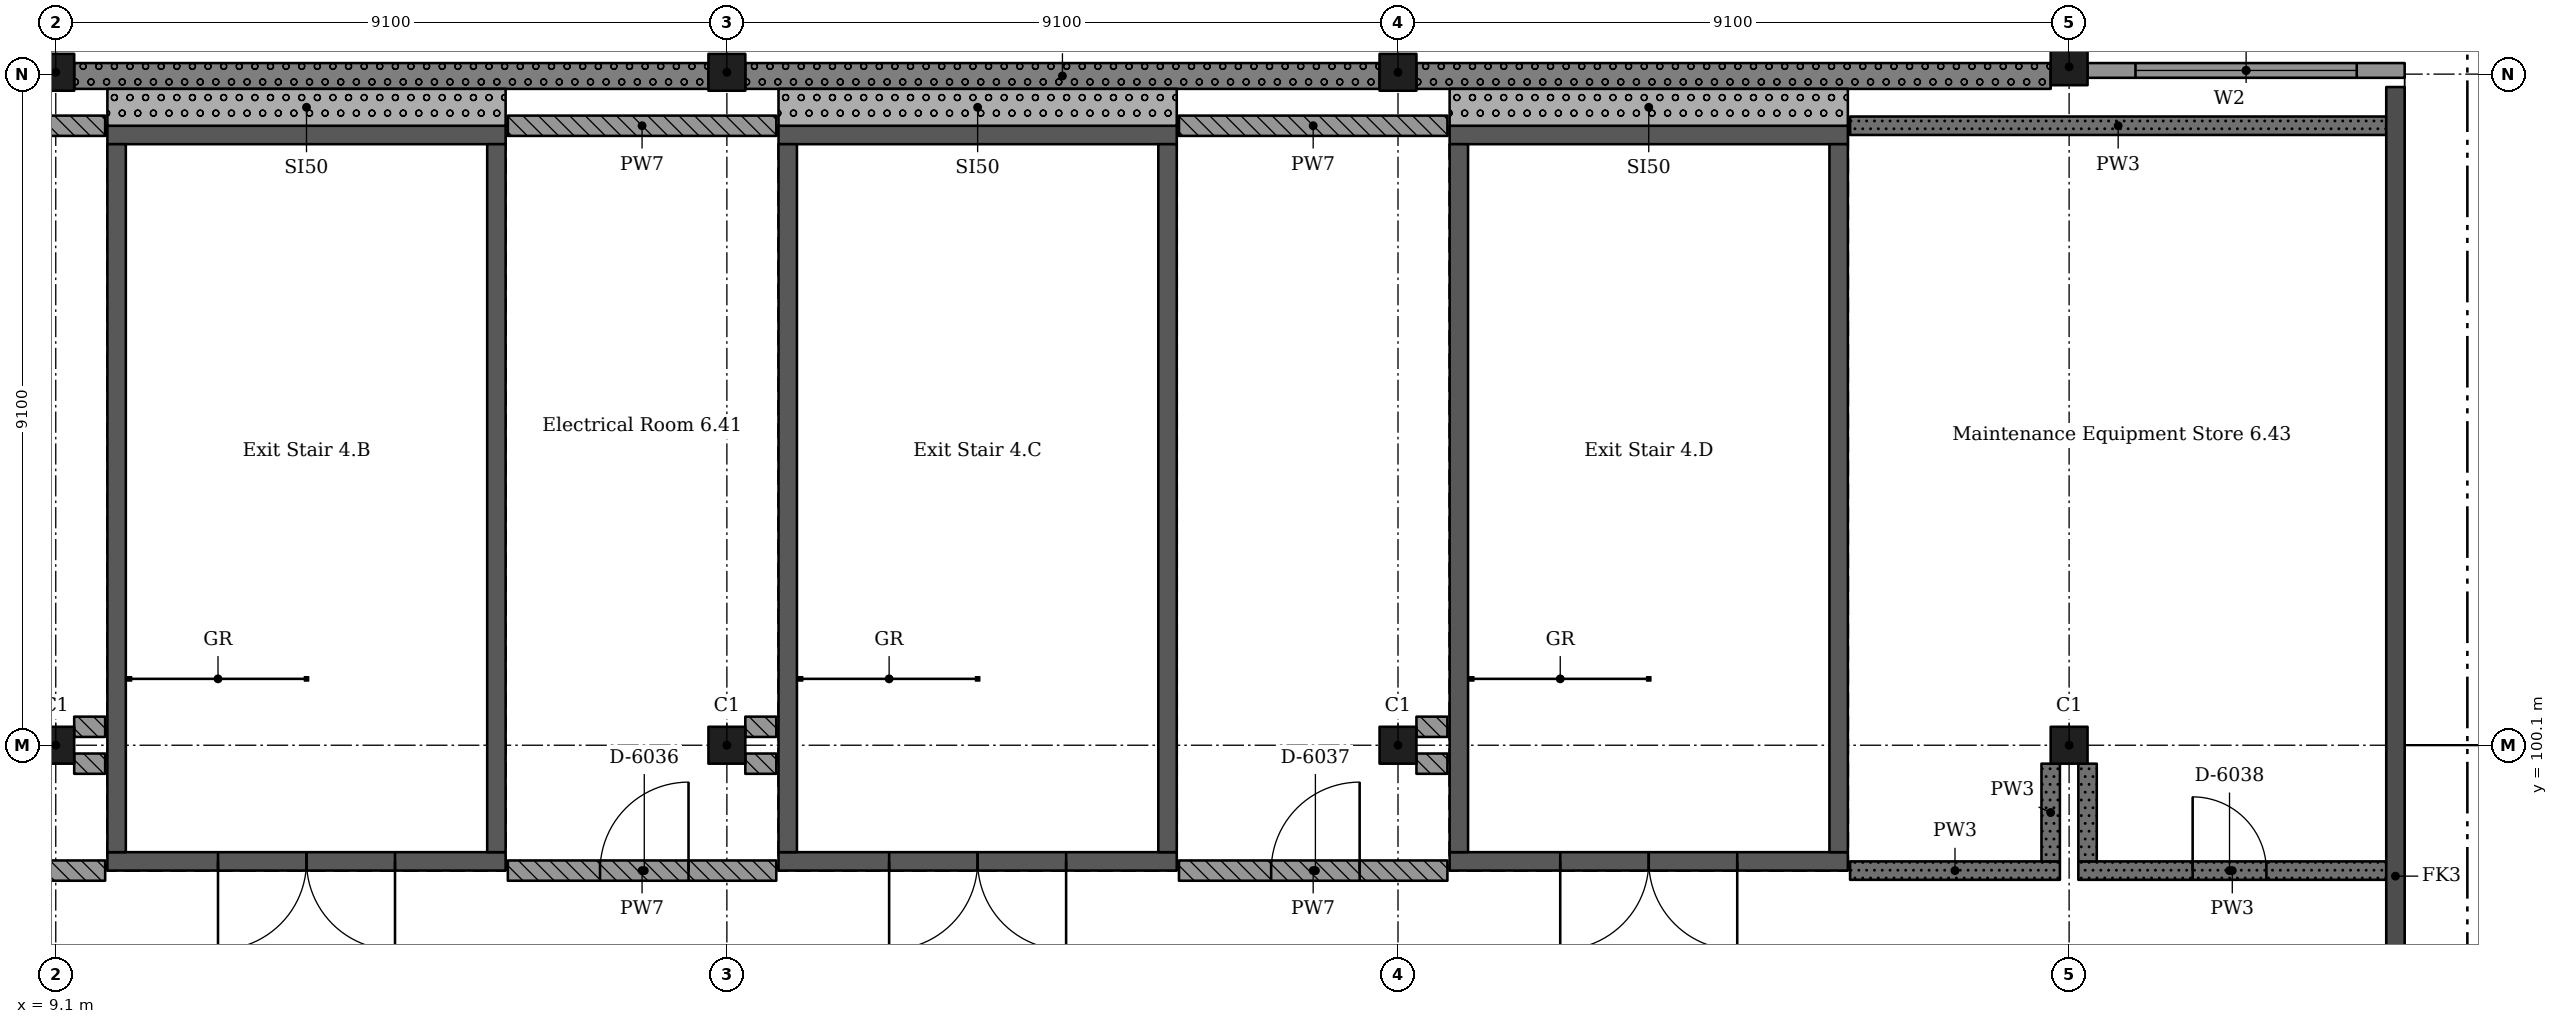
"""IFC4 building model, lengths in metres.
Left out: names, types, materials, properties, quantities, classifications, styles, units other than length and angle.
Written with IfcOpenShell. Run it as: python <this file> out.ifc"""

import sys

from ifc_helpers import new_model, si_unit, direction, frame, frame_2d, origin, origin_2d, place, context, subcontext, project, spatial, rectangle, extrude, element, fill, save


model = new_model("IFC4")
c1 = context("Model", 3, precision=1e-05, world=origin(), true_north=direction((0.0, 1.0)))
c2 = subcontext(c1, "Body", "Model", "MODEL_VIEW")
j1 = project(units=[si_unit("LENGTHUNIT", "METRE"), si_unit("PLANEANGLEUNIT", "RADIAN")], contexts=[c1])
p1 = place(None, origin())
s1 = spatial("IfcSite", under=j1, at=p1, CompositionType="ELEMENT")
p2 = place(p1, origin())
s2 = spatial("IfcBuilding", under=s1, at=p2, CompositionType="ELEMENT")
p3 = place(p2, frame((0.0, 0.0, 29.12)))
s3 = spatial("IfcBuildingStorey", under=s2, at=p3, CompositionType="ELEMENT", Elevation=29.12)
for number, where, z_axis, x_axis in (
    (1, (9.1, 100.1, 0.0), (0.0, 0.0, 1.0), (1.0, 0.0, 0.0)),
    (2, (9.1, 109.225, 0.0), (0.0, 0.0, 1.0), (1.0, 0.0, 0.0)),
    (3, (18.2, 100.1, 0.0), (0.0, 0.0, 1.0), (1.0, 0.0, 0.0)),
    (4, (18.2, 109.225, 0.0), (0.0, 0.0, 1.0), (1.0, 0.0, 0.0)),
    (5, (27.3, 100.1, 0.0), (0.0, 0.0, 1.0), (1.0, 0.0, 0.0)),
    (6, (27.3, 109.225, 0.0), (0.0, 0.0, 1.0), (1.0, 0.0, 0.0)),
    (7, (36.4, 100.1, 0.0), (0.0, 0.0, 1.0), (1.0, 0.0, 0.0)),
    (8, (36.4, 109.3, 0.0), (0.0, 0.0, 1.0), (1.0, 0.0, 0.0)),
):
    element("IfcColumn", number, at=place(p3, frame(where, z_axis=z_axis, x_axis=x_axis)), inside=s3, PredefinedType="COLUMN", context=c2, shape_type="SweptSolid", body=[
        extrude(rectangle(XDim=0.5, YDim=0.5, at=origin_2d()), origin(), (0.0, 0.0, 1.0), 4.55),
    ])
p4 = place(p3, frame((40.825, 68.25, 0.0), z_axis=(0.0, 0.0, 1.0), x_axis=(0.0, 1.0, 0.0)))
e9 = element("IfcWall", 9, at=p4, inside=s3, PredefinedType="SHEAR", context=c2, shape_type="SweptSolid", body=[
    extrude(rectangle(XDim=40.775, YDim=0.25, at=frame_2d((20.387, 0.0))), origin(), (0.0, 0.0, 1.0), 4.55),
])
p5 = place(p3, frame((15.2, 98.525, 0.0), z_axis=(0.0, 0.0, 1.0), x_axis=(-1.0, 0.0, 0.0)))
e10 = element("IfcWall", 10, at=p5, inside=s3, PredefinedType="SHEAR", context=c2, shape_type="SweptSolid", body=[
    extrude(rectangle(XDim=5.4, YDim=0.25, at=frame_2d((2.7, 0.0))), origin(), (0.0, 0.0, 1.0), 4.55),
])
p6 = place(p5, frame((1.5, 0.0, 0.0)))
e11 = element("IfcOpeningElement", 11, at=p6, cuts=e10, PredefinedType="OPENING", context=c2, shape_type="SweptSolid", body=[
    extrude(rectangle(XDim=2.4, YDim=2.1, at=frame_2d((1.2, 1.05))), frame((0.0, 0.135, 0.0), z_axis=(0.0, -1.0, 0.0), x_axis=(1.0, 0.0, 0.0)), (0.0, 0.0, 1.0), 0.27),
])
p7 = place(p3, frame((15.2, 108.375, 0.0), z_axis=(0.0, 0.0, 1.0), x_axis=(-1.0, 0.0, 0.0)))
e12 = element("IfcWall", 12, at=p7, inside=s3, PredefinedType="SHEAR", context=c2, shape_type="SweptSolid", body=[
    extrude(rectangle(XDim=5.4, YDim=0.25, at=frame_2d((2.7, 0.0))), origin(), (0.0, 0.0, 1.0), 4.55),
])
for number, where, z_axis, x_axis in (
    (13, (9.925, 108.25, 0.0), (0.0, 0.0, 1.0), (0.0, -1.0, 0.0)),
    (14, (15.075, 108.25, 0.0), (0.0, 0.0, 1.0), (0.0, -1.0, 0.0)),
):
    element("IfcWall", number, at=place(p3, frame(where, z_axis=z_axis, x_axis=x_axis)), inside=s3, PredefinedType="SHEAR", context=c2, shape_type="SweptSolid", body=[
        extrude(rectangle(XDim=9.6, YDim=0.25, at=frame_2d((4.8, 0.0))), origin(), (0.0, 0.0, 1.0), 4.55),
    ])
p8 = place(p3, frame((24.3, 98.525, 0.0), z_axis=(0.0, 0.0, 1.0), x_axis=(-1.0, 0.0, 0.0)))
e15 = element("IfcWall", 15, at=p8, inside=s3, PredefinedType="SHEAR", context=c2, shape_type="SweptSolid", body=[
    extrude(rectangle(XDim=5.4, YDim=0.25, at=frame_2d((2.7, 0.0))), origin(), (0.0, 0.0, 1.0), 4.55),
])
p9 = place(p8, frame((1.5, 0.0, 0.0)))
e16 = element("IfcOpeningElement", 16, at=p9, cuts=e15, PredefinedType="OPENING", context=c2, shape_type="SweptSolid", body=[
    extrude(rectangle(XDim=2.4, YDim=2.1, at=frame_2d((1.2, 1.05))), frame((0.0, 0.135, 0.0), z_axis=(0.0, -1.0, 0.0), x_axis=(1.0, 0.0, 0.0)), (0.0, 0.0, 1.0), 0.27),
])
p10 = place(p3, frame((24.3, 108.375, 0.0), z_axis=(0.0, 0.0, 1.0), x_axis=(-1.0, 0.0, 0.0)))
e17 = element("IfcWall", 17, at=p10, inside=s3, PredefinedType="SHEAR", context=c2, shape_type="SweptSolid", body=[
    extrude(rectangle(XDim=5.4, YDim=0.25, at=frame_2d((2.7, 0.0))), origin(), (0.0, 0.0, 1.0), 4.55),
])
for number, where, z_axis, x_axis in (
    (18, (19.025, 108.25, 0.0), (0.0, 0.0, 1.0), (0.0, -1.0, 0.0)),
    (19, (24.175, 108.25, 0.0), (0.0, 0.0, 1.0), (0.0, -1.0, 0.0)),
):
    element("IfcWall", number, at=place(p3, frame(where, z_axis=z_axis, x_axis=x_axis)), inside=s3, PredefinedType="SHEAR", context=c2, shape_type="SweptSolid", body=[
        extrude(rectangle(XDim=9.6, YDim=0.25, at=frame_2d((4.8, 0.0))), origin(), (0.0, 0.0, 1.0), 4.55),
    ])
p11 = place(p3, frame((33.4, 98.525, 0.0), z_axis=(0.0, 0.0, 1.0), x_axis=(-1.0, 0.0, 0.0)))
e20 = element("IfcWall", 20, at=p11, inside=s3, PredefinedType="SHEAR", context=c2, shape_type="SweptSolid", body=[
    extrude(rectangle(XDim=5.4, YDim=0.25, at=frame_2d((2.7, 0.0))), origin(), (0.0, 0.0, 1.0), 4.55),
])
p12 = place(p11, frame((1.5, 0.0, 0.0)))
e21 = element("IfcOpeningElement", 21, at=p12, cuts=e20, PredefinedType="OPENING", context=c2, shape_type="SweptSolid", body=[
    extrude(rectangle(XDim=2.4, YDim=2.1, at=frame_2d((1.2, 1.05))), frame((0.0, 0.135, 0.0), z_axis=(0.0, -1.0, 0.0), x_axis=(1.0, 0.0, 0.0)), (0.0, 0.0, 1.0), 0.27),
])
p13 = place(p3, frame((33.4, 108.375, 0.0), z_axis=(0.0, 0.0, 1.0), x_axis=(-1.0, 0.0, 0.0)))
e22 = element("IfcWall", 22, at=p13, inside=s3, PredefinedType="SHEAR", context=c2, shape_type="SweptSolid", body=[
    extrude(rectangle(XDim=5.4, YDim=0.25, at=frame_2d((2.7, 0.0))), origin(), (0.0, 0.0, 1.0), 4.55),
])
for number, where, z_axis, x_axis in (
    (23, (28.125, 108.25, 0.0), (0.0, 0.0, 1.0), (0.0, -1.0, 0.0)),
    (24, (33.275, 108.25, 0.0), (0.0, 0.0, 1.0), (0.0, -1.0, 0.0)),
):
    element("IfcWall", number, at=place(p3, frame(where, z_axis=z_axis, x_axis=x_axis)), inside=s3, PredefinedType="SHEAR", context=c2, shape_type="SweptSolid", body=[
        extrude(rectangle(XDim=9.6, YDim=0.25, at=frame_2d((4.8, 0.0))), origin(), (0.0, 0.0, 1.0), 4.55),
    ])
p14 = place(p3, frame((40.95, 109.25, 0.0), z_axis=(0.0, 0.0, 1.0), x_axis=(-1.0, 0.0, 0.0)))
e25 = element("IfcWall", 25, at=p14, inside=s3, PredefinedType="SOLIDWALL", context=c2, shape_type="SweptSolid", body=[
    extrude(rectangle(XDim=4.3, YDim=0.2, at=frame_2d((2.15, 0.0))), origin(), (0.0, 0.0, 1.0), 4.5),
])
p15 = place(p14, frame((0.65, 0.0, 0.6)))
e26 = element("IfcOpeningElement", 26, at=p15, cuts=e25, PredefinedType="OPENING", context=c2, shape_type="SweptSolid", body=[
    extrude(rectangle(XDim=3.0, YDim=3.0, at=frame_2d((1.5, 1.5))), frame((0.0, 0.11, 0.0), z_axis=(0.0, -1.0, 0.0), x_axis=(1.0, 0.0, 0.0)), (0.0, 0.0, 1.0), 0.22),
])
p16 = place(p3, frame((36.15, 109.175, 0.0), z_axis=(0.0, 0.0, 1.0), x_axis=(-1.0, 0.0, 0.0)))
e27 = element("IfcWall", 27, at=p16, inside=s3, PredefinedType="SOLIDWALL", context=c2, shape_type="SweptSolid", body=[
    extrude(rectangle(XDim=8.6, YDim=0.35, at=frame_2d((4.3, 0.0))), origin(), (0.0, 0.0, 1.0), 4.5),
])
p17 = place(p3, frame((27.05, 109.175, 0.0), z_axis=(0.0, 0.0, 1.0), x_axis=(-1.0, 0.0, 0.0)))
e28 = element("IfcWall", 28, at=p17, inside=s3, PredefinedType="SOLIDWALL", context=c2, shape_type="SweptSolid", body=[
    extrude(rectangle(XDim=8.6, YDim=0.35, at=frame_2d((4.3, 0.0))), origin(), (0.0, 0.0, 1.0), 4.5),
])
p18 = place(p3, frame((17.95, 109.175, 0.0), z_axis=(0.0, 0.0, 1.0), x_axis=(-1.0, 0.0, 0.0)))
e29 = element("IfcWall", 29, at=p18, inside=s3, PredefinedType="SOLIDWALL", context=c2, shape_type="SweptSolid", body=[
    extrude(rectangle(XDim=8.6, YDim=0.35, at=frame_2d((4.3, 0.0))), origin(), (0.0, 0.0, 1.0), 4.5),
])
p19 = place(p3, frame((9.8, 108.75, 0.0), z_axis=(0.0, 0.0, 1.0), x_axis=(1.0, 0.0, 0.0)))
e30 = element("IfcWall", 30, at=p19, inside=s3, PredefinedType="SOLIDWALL", context=c2, shape_type="SweptSolid", body=[
    extrude(rectangle(XDim=5.4, YDim=0.5, at=frame_2d((2.7, 0.0))), origin(), (0.0, 0.0, 1.0), 3.88),
])
p20 = place(p3, frame((18.9, 108.75, 0.0), z_axis=(0.0, 0.0, 1.0), x_axis=(1.0, 0.0, 0.0)))
e31 = element("IfcWall", 31, at=p20, inside=s3, PredefinedType="SOLIDWALL", context=c2, shape_type="SweptSolid", body=[
    extrude(rectangle(XDim=5.4, YDim=0.5, at=frame_2d((2.7, 0.0))), origin(), (0.0, 0.0, 1.0), 3.88),
])
p21 = place(p3, frame((28.0, 108.75, 0.0), z_axis=(0.0, 0.0, 1.0), x_axis=(1.0, 0.0, 0.0)))
e32 = element("IfcWall", 32, at=p21, inside=s3, PredefinedType="SOLIDWALL", context=c2, shape_type="SweptSolid", body=[
    extrude(rectangle(XDim=5.4, YDim=0.5, at=frame_2d((2.7, 0.0))), origin(), (0.0, 0.0, 1.0), 3.88),
])
p22 = place(p3, frame((6.13, 98.4, 0.0), z_axis=(0.0, 0.0, 1.0), x_axis=(1.0, 0.0, 0.0)))
e33 = element("IfcWall", 33, at=p22, inside=s3, PredefinedType="SOLIDWALL", context=c2, shape_type="SweptSolid", body=[
    extrude(rectangle(XDim=3.64, YDim=0.275, at=frame_2d((1.82, 0.0))), origin(), (0.0, 0.0, 1.0), 3.88),
])
p23 = place(p22, frame((1.25, 0.0, 0.0)))
e34 = element("IfcOpeningElement", 34, at=p23, cuts=e33, PredefinedType="OPENING", context=c2, shape_type="SweptSolid", body=[
    extrude(rectangle(XDim=1.2, YDim=2.4, at=frame_2d((0.6, 1.2))), frame((0.0, 0.147, 0.0), z_axis=(0.0, -1.0, 0.0), x_axis=(1.0, 0.0, 0.0)), (0.0, 0.0, 1.0), 0.295),
])
p24 = place(p3, frame((6.13, 108.5, 0.0), z_axis=(0.0, 0.0, 1.0), x_axis=(1.0, 0.0, 0.0)))
e35 = element("IfcWall", 35, at=p24, inside=s3, PredefinedType="SOLIDWALL", context=c2, shape_type="SweptSolid", body=[
    extrude(rectangle(XDim=3.64, YDim=0.275, at=frame_2d((1.82, 0.0))), origin(), (0.0, 0.0, 1.0), 3.88),
])
for number, where, z_axis, x_axis in (
    (36, (9.35, 99.85, 0.0), (0.0, 0.0, 1.0), (1.0, 0.0, 0.0)),
    (37, (9.77, 100.35, 0.0), (0.0, 0.0, 1.0), (-1.0, 0.0, 0.0)),
):
    element("IfcWall", number, at=place(p3, frame(where, z_axis=z_axis, x_axis=x_axis)), inside=s3, PredefinedType="SOLIDWALL", context=c2, shape_type="SweptSolid", body=[
        extrude(rectangle(XDim=0.42, YDim=0.275, at=frame_2d((0.21, 0.0))), origin(), (0.0, 0.0, 1.0), 3.88),
    ])
p25 = place(p3, frame((15.23, 98.4, 0.0), z_axis=(0.0, 0.0, 1.0), x_axis=(1.0, 0.0, 0.0)))
e38 = element("IfcWall", 38, at=p25, inside=s3, PredefinedType="SOLIDWALL", context=c2, shape_type="SweptSolid", body=[
    extrude(rectangle(XDim=3.64, YDim=0.275, at=frame_2d((1.82, 0.0))), origin(), (0.0, 0.0, 1.0), 3.88),
])
p26 = place(p25, frame((1.25, 0.0, 0.0)))
e39 = element("IfcOpeningElement", 39, at=p26, cuts=e38, PredefinedType="OPENING", context=c2, shape_type="SweptSolid", body=[
    extrude(rectangle(XDim=1.2, YDim=2.4, at=frame_2d((0.6, 1.2))), frame((0.0, 0.147, 0.0), z_axis=(0.0, -1.0, 0.0), x_axis=(1.0, 0.0, 0.0)), (0.0, 0.0, 1.0), 0.295),
])
p27 = place(p3, frame((15.23, 108.5, 0.0), z_axis=(0.0, 0.0, 1.0), x_axis=(1.0, 0.0, 0.0)))
e40 = element("IfcWall", 40, at=p27, inside=s3, PredefinedType="SOLIDWALL", context=c2, shape_type="SweptSolid", body=[
    extrude(rectangle(XDim=3.64, YDim=0.275, at=frame_2d((1.82, 0.0))), origin(), (0.0, 0.0, 1.0), 3.88),
])
for number, where, z_axis, x_axis in (
    (41, (18.45, 99.85, 0.0), (0.0, 0.0, 1.0), (1.0, 0.0, 0.0)),
    (42, (18.87, 100.35, 0.0), (0.0, 0.0, 1.0), (-1.0, 0.0, 0.0)),
):
    element("IfcWall", number, at=place(p3, frame(where, z_axis=z_axis, x_axis=x_axis)), inside=s3, PredefinedType="SOLIDWALL", context=c2, shape_type="SweptSolid", body=[
        extrude(rectangle(XDim=0.42, YDim=0.275, at=frame_2d((0.21, 0.0))), origin(), (0.0, 0.0, 1.0), 3.88),
    ])
p28 = place(p3, frame((24.33, 98.4, 0.0), z_axis=(0.0, 0.0, 1.0), x_axis=(1.0, 0.0, 0.0)))
e43 = element("IfcWall", 43, at=p28, inside=s3, PredefinedType="SOLIDWALL", context=c2, shape_type="SweptSolid", body=[
    extrude(rectangle(XDim=3.64, YDim=0.275, at=frame_2d((1.82, 0.0))), origin(), (0.0, 0.0, 1.0), 3.88),
])
p29 = place(p28, frame((1.25, 0.0, 0.0)))
e44 = element("IfcOpeningElement", 44, at=p29, cuts=e43, PredefinedType="OPENING", context=c2, shape_type="SweptSolid", body=[
    extrude(rectangle(XDim=1.2, YDim=2.4, at=frame_2d((0.6, 1.2))), frame((0.0, 0.147, 0.0), z_axis=(0.0, -1.0, 0.0), x_axis=(1.0, 0.0, 0.0)), (0.0, 0.0, 1.0), 0.295),
])
p30 = place(p3, frame((24.33, 108.5, 0.0), z_axis=(0.0, 0.0, 1.0), x_axis=(1.0, 0.0, 0.0)))
e45 = element("IfcWall", 45, at=p30, inside=s3, PredefinedType="SOLIDWALL", context=c2, shape_type="SweptSolid", body=[
    extrude(rectangle(XDim=3.64, YDim=0.275, at=frame_2d((1.82, 0.0))), origin(), (0.0, 0.0, 1.0), 3.88),
])
for number, where, z_axis, x_axis in (
    (46, (27.55, 99.85, 0.0), (0.0, 0.0, 1.0), (1.0, 0.0, 0.0)),
    (47, (27.97, 100.35, 0.0), (0.0, 0.0, 1.0), (-1.0, 0.0, 0.0)),
):
    element("IfcWall", number, at=place(p3, frame(where, z_axis=z_axis, x_axis=x_axis)), inside=s3, PredefinedType="SOLIDWALL", context=c2, shape_type="SweptSolid", body=[
        extrude(rectangle(XDim=0.42, YDim=0.275, at=frame_2d((0.21, 0.0))), origin(), (0.0, 0.0, 1.0), 3.88),
    ])
p31 = place(p3, frame((33.43, 98.4, 0.0), z_axis=(0.0, 0.0, 1.0), x_axis=(1.0, 0.0, 0.0)))
e48 = element("IfcWall", 48, at=p31, inside=s3, PredefinedType="SOLIDWALL", context=c2, shape_type="SweptSolid", body=[
    extrude(rectangle(XDim=2.845, YDim=0.25, at=frame_2d((1.422, 0.0))), origin(), (0.0, 0.0, 1.0), 3.88),
])
p32 = place(p3, frame((33.43, 108.5, 0.0), z_axis=(0.0, 0.0, 1.0), x_axis=(1.0, 0.0, 0.0)))
e49 = element("IfcWall", 49, at=p32, inside=s3, PredefinedType="SOLIDWALL", context=c2, shape_type="SweptSolid", body=[
    extrude(rectangle(XDim=7.27, YDim=0.25, at=frame_2d((3.635, 0.0))), origin(), (0.0, 0.0, 1.0), 3.88),
])
p33 = place(p3, frame((36.15, 98.525, 0.0), z_axis=(0.0, 0.0, 1.0), x_axis=(0.0, 1.0, 0.0)))
e50 = element("IfcWall", 50, at=p33, inside=s3, PredefinedType="SOLIDWALL", context=c2, shape_type="SweptSolid", body=[
    extrude(rectangle(XDim=1.325, YDim=0.25, at=frame_2d((0.663, 0.0))), origin(), (0.0, 0.0, 1.0), 3.88),
])
p34 = place(p3, frame((36.525, 98.4, 0.0), z_axis=(0.0, 0.0, 1.0), x_axis=(1.0, 0.0, 0.0)))
e51 = element("IfcWall", 51, at=p34, inside=s3, PredefinedType="SOLIDWALL", context=c2, shape_type="SweptSolid", body=[
    extrude(rectangle(XDim=4.175, YDim=0.25, at=frame_2d((2.087, 0.0))), origin(), (0.0, 0.0, 1.0), 3.88),
])
p35 = place(p34, frame((1.55, 0.0, 0.0)))
e52 = element("IfcOpeningElement", 52, at=p35, cuts=e51, PredefinedType="OPENING", context=c2, shape_type="SweptSolid", body=[
    extrude(rectangle(XDim=1.0, YDim=2.1, at=frame_2d((0.5, 1.05))), frame((0.0, 0.135, 0.0), z_axis=(0.0, -1.0, 0.0), x_axis=(1.0, 0.0, 0.0)), (0.0, 0.0, 1.0), 0.27),
])
p36 = place(p3, frame((36.65, 99.85, 0.0), z_axis=(0.0, 0.0, 1.0), x_axis=(0.0, -1.0, 0.0)))
e53 = element("IfcWall", 53, at=p36, inside=s3, PredefinedType="SOLIDWALL", context=c2, shape_type="SweptSolid", body=[
    extrude(rectangle(XDim=1.325, YDim=0.25, at=frame_2d((0.663, 0.0))), origin(), (0.0, 0.0, 1.0), 3.88),
])
p37 = place(p15, origin())
e54 = element("IfcWindow", 54, at=p37, inside=s3, PartitioningType="SINGLE_PANEL", PredefinedType="WINDOW", context=c2, shape_type="SweptSolid", body=[
    extrude(rectangle(XDim=3.0, YDim=3.0, at=frame_2d((1.5, 1.5))), frame((0.0, 0.03, 0.0), z_axis=(0.0, -1.0, 0.0), x_axis=(1.0, 0.0, 0.0)), (0.0, 0.0, 1.0), 0.06),
])
fill(e26, e54)
p38 = place(p26, origin())
e55 = element("IfcDoor", 55, at=p38, inside=s3, OperationType="SINGLE_SWING_LEFT", PredefinedType="DOOR", context=c2, shape_type="SweptSolid", body=[
    extrude(rectangle(XDim=1.2, YDim=2.4, at=frame_2d((0.6, 1.2))), frame((0.0, 0.025, 0.0), z_axis=(0.0, -1.0, 0.0), x_axis=(1.0, 0.0, 0.0)), (0.0, 0.0, 1.0), 0.05),
])
fill(e39, e55)
p39 = place(p29, origin())
e56 = element("IfcDoor", 56, at=p39, inside=s3, OperationType="SINGLE_SWING_LEFT", PredefinedType="DOOR", context=c2, shape_type="SweptSolid", body=[
    extrude(rectangle(XDim=1.2, YDim=2.4, at=frame_2d((0.6, 1.2))), frame((0.0, 0.025, 0.0), z_axis=(0.0, -1.0, 0.0), x_axis=(1.0, 0.0, 0.0)), (0.0, 0.0, 1.0), 0.05),
])
fill(e44, e56)
p40 = place(p35, origin())
e57 = element("IfcDoor", 57, at=p40, inside=s3, OperationType="SINGLE_SWING_RIGHT", PredefinedType="DOOR", context=c2, shape_type="SweptSolid", body=[
    extrude(rectangle(XDim=1.0, YDim=2.1, at=frame_2d((0.5, 1.05))), frame((0.0, 0.025, 0.0), z_axis=(0.0, -1.0, 0.0), x_axis=(1.0, 0.0, 0.0)), (0.0, 0.0, 1.0), 0.05),
])
fill(e52, e57)
p41 = place(p6, origin())
e58 = element("IfcDoor", 58, at=p41, inside=s3, OperationType="DOUBLE_DOOR_SINGLE_SWING", PredefinedType="DOOR", context=c2, shape_type="SweptSolid", body=[
    extrude(rectangle(XDim=2.4, YDim=2.1, at=frame_2d((1.2, 1.05))), frame((0.0, 0.025, 0.0), z_axis=(0.0, -1.0, 0.0), x_axis=(1.0, 0.0, 0.0)), (0.0, 0.0, 1.0), 0.05),
])
fill(e11, e58)
p42 = place(p9, origin())
e59 = element("IfcDoor", 59, at=p42, inside=s3, OperationType="DOUBLE_DOOR_SINGLE_SWING", PredefinedType="DOOR", context=c2, shape_type="SweptSolid", body=[
    extrude(rectangle(XDim=2.4, YDim=2.1, at=frame_2d((1.2, 1.05))), frame((0.0, 0.025, 0.0), z_axis=(0.0, -1.0, 0.0), x_axis=(1.0, 0.0, 0.0)), (0.0, 0.0, 1.0), 0.05),
])
fill(e16, e59)
p43 = place(p12, origin())
e60 = element("IfcDoor", 60, at=p43, inside=s3, OperationType="DOUBLE_DOOR_SINGLE_SWING", PredefinedType="DOOR", context=c2, shape_type="SweptSolid", body=[
    extrude(rectangle(XDim=2.4, YDim=2.1, at=frame_2d((1.2, 1.05))), frame((0.0, 0.025, 0.0), z_axis=(0.0, -1.0, 0.0), x_axis=(1.0, 0.0, 0.0)), (0.0, 0.0, 1.0), 0.05),
])
fill(e21, e60)
save(model, sys.argv[1])
